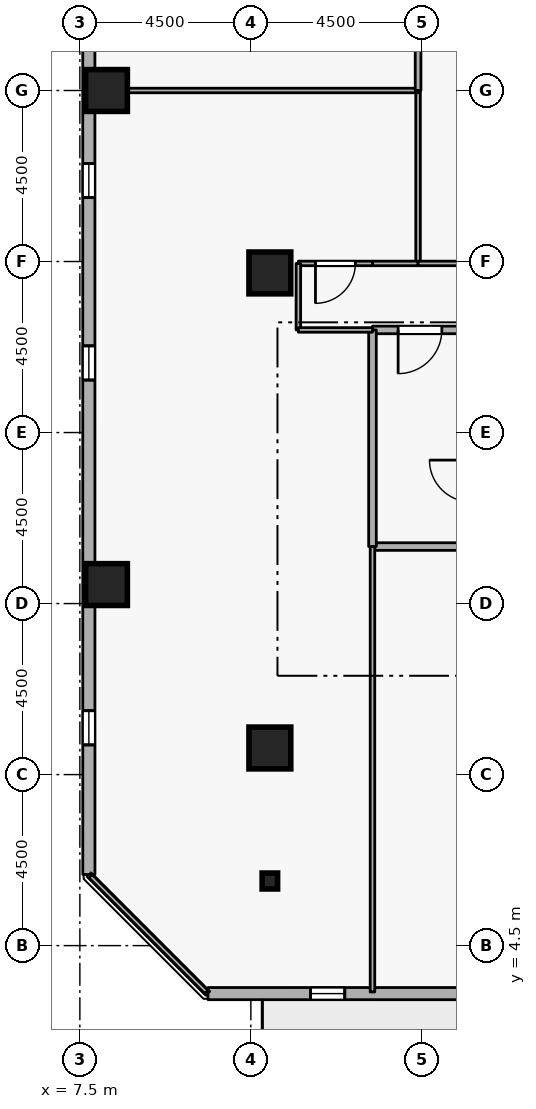
"""IFC4 building model, lengths in metres.
Left out: names, types, materials, properties, quantities, classifications, styles, units other than length and angle.
Written with IfcOpenShell. Run it as: python <this file> out.ifc"""

import sys

from ifc_helpers import new_model, si_unit, direction, frame, frame_2d, origin, origin_2d, place, context, subcontext, project, spatial, rectangle, i_section, extrude, element, fill, save


model = new_model("IFC4")
c1 = context("Model", 3, precision=1e-05, world=origin(), true_north=direction((0.0, 1.0)))
c2 = subcontext(c1, "Body", "Model", "MODEL_VIEW")
j1 = project(units=[si_unit("LENGTHUNIT", "METRE"), si_unit("PLANEANGLEUNIT", "RADIAN")], contexts=[c1])
p1 = place(None, origin())
s1 = spatial("IfcSite", under=j1, at=p1, CompositionType="ELEMENT")
p2 = place(p1, origin())
s2 = spatial("IfcBuilding", under=s1, at=p2, CompositionType="ELEMENT")
p3 = place(p2, frame((0.0, 0.0, 163.5)))
s3 = spatial("IfcBuildingStorey", under=s2, at=p3, CompositionType="ELEMENT", Elevation=163.5)
for number, where, z_axis, x_axis in (
    (1, (12.5, 9.7, 0.0), (0.0, 0.0, 1.0), (1.0, 0.0, 0.0)),
    (2, (8.2, 14.0, 0.0), (0.0, 0.0, 1.0), (1.0, 0.0, 0.0)),
    (3, (8.2, 27.0, 0.0), (0.0, 0.0, 1.0), (1.0, 0.0, 0.0)),
    (4, (12.5, 22.2, 0.0), (0.0, 0.0, 1.0), (1.0, 0.0, 0.0)),
):
    element("IfcColumn", number, at=place(p3, frame(where, z_axis=z_axis, x_axis=x_axis)), inside=s3, PredefinedType="COLUMN", context=c2, shape_type="SweptSolid", body=[
        extrude(rectangle(XDim=1.1, YDim=1.1, at=origin_2d()), origin(), (0.0, 0.0, 1.0), 3.6),
    ])
p4 = place(p3, frame((12.5, 6.2, 0.0), z_axis=(0.0, 0.0, 1.0), x_axis=(1.0, 0.0, 0.0)))
e5 = element("IfcColumn", 5, at=p4, inside=s3, PredefinedType="COLUMN", context=c2, shape_type="SweptSolid", body=[
    extrude(i_section(OverallWidth=0.407, OverallDepth=0.419, WebThickness=0.031, FlangeThickness=0.049, FilletRadius=0.015, at=origin_2d()), origin(), (0.0, 0.0, 1.0), 3.6),
])
p5 = place(p3, frame((10.871, 3.237, 0.0), z_axis=(0.0, 0.0, 1.0), x_axis=(0.999999998513, -5.4540124e-05, 0.0)))
e6 = element("IfcWall", 6, at=p5, inside=s3, PredefinedType="STANDARD", context=c2, shape_type="SweptSolid", body=[
    extrude(rectangle(XDim=35.811, YDim=0.32, at=frame_2d((17.905, 0.0))), origin(), (0.0, 0.0, 1.0), 2.7),
])
p6 = place(p5, frame((22.855, 0.0, 0.0)))
e7 = element("IfcOpeningElement", 7, at=p6, cuts=e6, PredefinedType="OPENING", context=c2, shape_type="SweptSolid", body=[
    extrude(rectangle(XDim=1.0, YDim=2.08, at=frame_2d((0.5, 1.04))), frame((0.0, 0.17, 0.0), z_axis=(0.0, -1.0, 0.0), x_axis=(1.0, 0.0, 0.0)), (0.0, 0.0, 1.0), 0.34),
])
p7 = place(p5, frame((2.7, 0.0, 0.72)))
e8 = element("IfcOpeningElement", 8, at=p7, cuts=e6, PredefinedType="OPENING", context=c2, shape_type="SweptSolid", body=[
    extrude(rectangle(XDim=0.9, YDim=1.75, at=frame_2d((0.45, 0.875))), frame((0.0, 0.17, 0.0), z_axis=(0.0, -1.0, 0.0), x_axis=(1.0, 0.0, 0.0)), (0.0, 0.0, 1.0), 0.34),
])
p8 = place(p5, frame((7.5, 0.0, 0.72)))
e9 = element("IfcOpeningElement", 9, at=p8, cuts=e6, PredefinedType="OPENING", context=c2, shape_type="SweptSolid", body=[
    extrude(rectangle(XDim=0.9, YDim=1.75, at=frame_2d((0.45, 0.875))), frame((0.0, 0.17, 0.0), z_axis=(0.0, -1.0, 0.0), x_axis=(1.0, 0.0, 0.0)), (0.0, 0.0, 1.0), 0.34),
])
p9 = place(p5, frame((12.3, 0.0, 0.72)))
e10 = element("IfcOpeningElement", 10, at=p9, cuts=e6, PredefinedType="OPENING", context=c2, shape_type="SweptSolid", body=[
    extrude(rectangle(XDim=0.9, YDim=1.75, at=frame_2d((0.45, 0.875))), frame((0.0, 0.17, 0.0), z_axis=(0.0, -1.0, 0.0), x_axis=(1.0, 0.0, 0.0)), (0.0, 0.0, 1.0), 0.34),
])
p10 = place(p5, frame((17.1, 0.0, 0.72)))
e11 = element("IfcOpeningElement", 11, at=p10, cuts=e6, PredefinedType="OPENING", context=c2, shape_type="SweptSolid", body=[
    extrude(rectangle(XDim=0.9, YDim=1.75, at=frame_2d((0.45, 0.875))), frame((0.0, 0.17, 0.0), z_axis=(0.0, -1.0, 0.0), x_axis=(1.0, 0.0, 0.0)), (0.0, 0.0, 1.0), 0.34),
])
p11 = place(p5, frame((26.7, 0.0, 0.72)))
e12 = element("IfcOpeningElement", 12, at=p11, cuts=e6, PredefinedType="OPENING", context=c2, shape_type="SweptSolid", body=[
    extrude(rectangle(XDim=0.9, YDim=1.75, at=frame_2d((0.45, 0.875))), frame((0.0, 0.17, 0.0), z_axis=(0.0, -1.0, 0.0), x_axis=(1.0, 0.0, 0.0)), (0.0, 0.0, 1.0), 0.34),
])
p12 = place(p5, frame((31.5, 0.0, 0.72)))
e13 = element("IfcOpeningElement", 13, at=p12, cuts=e6, PredefinedType="OPENING", context=c2, shape_type="SweptSolid", body=[
    extrude(rectangle(XDim=0.9, YDim=1.75, at=frame_2d((0.45, 0.875))), frame((0.0, 0.17, 0.0), z_axis=(0.0, -1.0, 0.0), x_axis=(1.0, 0.0, 0.0)), (0.0, 0.0, 1.0), 0.34),
])
p13 = place(p3, frame((7.735, 42.181, 0.0), z_axis=(0.0, 0.0, 1.0), x_axis=(5.4540124e-05, -0.999999998513, 0.0)))
e14 = element("IfcWall", 14, at=p13, inside=s3, PredefinedType="STANDARD", context=c2, shape_type="SweptSolid", body=[
    extrude(rectangle(XDim=35.811, YDim=0.32, at=frame_2d((17.905, 0.0))), origin(), (0.0, 0.0, 1.0), 2.7),
])
p14 = place(p13, frame((7.5, 0.0, 0.72)))
e15 = element("IfcOpeningElement", 15, at=p14, cuts=e14, PredefinedType="OPENING", context=c2, shape_type="SweptSolid", body=[
    extrude(rectangle(XDim=0.9, YDim=1.75, at=frame_2d((0.45, 0.875))), frame((0.0, 0.17, 0.0), z_axis=(0.0, -1.0, 0.0), x_axis=(1.0, 0.0, 0.0)), (0.0, 0.0, 1.0), 0.34),
])
p15 = place(p13, frame((12.3, 0.0, 0.72)))
e16 = element("IfcOpeningElement", 16, at=p15, cuts=e14, PredefinedType="OPENING", context=c2, shape_type="SweptSolid", body=[
    extrude(rectangle(XDim=0.9, YDim=1.75, at=frame_2d((0.45, 0.875))), frame((0.0, 0.17, 0.0), z_axis=(0.0, -1.0, 0.0), x_axis=(1.0, 0.0, 0.0)), (0.0, 0.0, 1.0), 0.34),
])
p16 = place(p13, frame((17.1, 0.0, 0.72)))
e17 = element("IfcOpeningElement", 17, at=p16, cuts=e14, PredefinedType="OPENING", context=c2, shape_type="SweptSolid", body=[
    extrude(rectangle(XDim=0.9, YDim=1.75, at=frame_2d((0.45, 0.875))), frame((0.0, 0.17, 0.0), z_axis=(0.0, -1.0, 0.0), x_axis=(1.0, 0.0, 0.0)), (0.0, 0.0, 1.0), 0.34),
])
p17 = place(p13, frame((21.9, 0.0, 0.72)))
e18 = element("IfcOpeningElement", 18, at=p17, cuts=e14, PredefinedType="OPENING", context=c2, shape_type="SweptSolid", body=[
    extrude(rectangle(XDim=0.9, YDim=1.75, at=frame_2d((0.45, 0.875))), frame((0.0, 0.17, 0.0), z_axis=(0.0, -1.0, 0.0), x_axis=(1.0, 0.0, 0.0)), (0.0, 0.0, 1.0), 0.34),
])
p18 = place(p13, frame((31.5, 0.0, 0.72)))
e19 = element("IfcOpeningElement", 19, at=p18, cuts=e14, PredefinedType="OPENING", context=c2, shape_type="SweptSolid", body=[
    extrude(rectangle(XDim=0.9, YDim=1.75, at=frame_2d((0.45, 0.875))), frame((0.0, 0.17, 0.0), z_axis=(0.0, -1.0, 0.0), x_axis=(1.0, 0.0, 0.0)), (0.0, 0.0, 1.0), 0.34),
])
p19 = place(p3, frame((15.2, 15.0, 0.0), z_axis=(0.0, 0.0, 1.0), x_axis=(1.0, 0.0, 0.0)))
e20 = element("IfcWall", 20, at=p19, inside=s3, PredefinedType="STANDARD", context=c2, shape_type="SweptSolid", body=[
    extrude(rectangle(XDim=2.5, YDim=0.2, at=frame_2d((1.25, 0.0))), origin(), (0.0, 0.0, 1.0), 3.34),
])
p20 = place(p3, frame((17.7, 20.7, 0.0), z_axis=(0.0, 0.0, 1.0), x_axis=(-1.0, 0.0, 0.0)))
e21 = element("IfcWall", 21, at=p20, inside=s3, PredefinedType="STANDARD", context=c2, shape_type="SweptSolid", body=[
    extrude(rectangle(XDim=2.5, YDim=0.2, at=frame_2d((1.25, 0.0))), origin(), (0.0, 0.0, 1.0), 3.34),
])
p21 = place(p20, frame((0.675, 0.0, 0.0)))
e22 = element("IfcOpeningElement", 22, at=p21, cuts=e21, PredefinedType="OPENING", context=c2, shape_type="SweptSolid", body=[
    extrude(rectangle(XDim=1.15, YDim=2.1, at=frame_2d((0.575, 1.05))), frame((0.0, 0.11, 0.0), z_axis=(0.0, -1.0, 0.0), x_axis=(1.0, 0.0, 0.0)), (0.0, 0.0, 1.0), 0.22),
])
p22 = place(p3, frame((15.2, 20.7, 0.0), z_axis=(0.0, 0.0, 1.0), x_axis=(0.0, -1.0, 0.0)))
e23 = element("IfcWall", 23, at=p22, inside=s3, PredefinedType="STANDARD", context=c2, shape_type="SweptSolid", body=[
    extrude(rectangle(XDim=5.7, YDim=0.2, at=frame_2d((2.85, 0.0))), origin(), (0.0, 0.0, 1.0), 3.34),
])
p23 = place(p3, frame((16.4, 27.0, 0.0), z_axis=(0.0, 0.0, 1.0), x_axis=(0.0, -1.0, 0.0)))
e24 = element("IfcWall", 24, at=p23, inside=s3, PredefinedType="PARTITIONING", context=c2, shape_type="SweptSolid", body=[
    extrude(rectangle(XDim=4.55, YDim=0.12, at=frame_2d((2.275, 0.0))), origin(), (0.0, 0.0, 1.0), 3.34),
])
p24 = place(p3, frame((16.4, 22.45, 0.0), z_axis=(0.0, 0.0, 1.0), x_axis=(-1.0, 0.0, 0.0)))
e25 = element("IfcWall", 25, at=p24, inside=s3, PredefinedType="PARTITIONING", context=c2, shape_type="SweptSolid", body=[
    extrude(rectangle(XDim=1.2, YDim=0.12, at=frame_2d((0.6, 0.0))), origin(), (0.0, 0.0, 1.0), 3.34),
])
p25 = place(p3, frame((15.2, 22.45, 0.0), z_axis=(0.0, 0.0, 1.0), x_axis=(-1.0, 0.0, 0.0)))
e26 = element("IfcWall", 26, at=p25, inside=s3, PredefinedType="PARTITIONING", context=c2, shape_type="SweptSolid", body=[
    extrude(rectangle(XDim=1.95, YDim=0.12, at=frame_2d((0.975, 0.0))), origin(), (0.0, 0.0, 1.0), 3.34),
])
p26 = place(p25, frame((0.45, 0.0, 0.0)))
e27 = element("IfcOpeningElement", 27, at=p26, cuts=e26, PredefinedType="OPENING", context=c2, shape_type="SweptSolid", body=[
    extrude(rectangle(XDim=1.05, YDim=2.1, at=frame_2d((0.525, 1.05))), frame((0.0, 0.07, 0.0), z_axis=(0.0, -1.0, 0.0), x_axis=(1.0, 0.0, 0.0)), (0.0, 0.0, 1.0), 0.14),
])
p27 = place(p3, frame((13.25, 22.45, 0.0), z_axis=(0.0, 0.0, 1.0), x_axis=(0.0, -1.0, 0.0)))
e28 = element("IfcWall", 28, at=p27, inside=s3, PredefinedType="PARTITIONING", context=c2, shape_type="SweptSolid", body=[
    extrude(rectangle(XDim=1.75, YDim=0.12, at=frame_2d((0.875, 0.0))), origin(), (0.0, 0.0, 1.0), 3.34),
])
p28 = place(p3, frame((13.25, 20.7, 0.0), z_axis=(0.0, 0.0, 1.0), x_axis=(1.0, 0.0, 0.0)))
e29 = element("IfcWall", 29, at=p28, inside=s3, PredefinedType="PARTITIONING", context=c2, shape_type="SweptSolid", body=[
    extrude(rectangle(XDim=1.95, YDim=0.12, at=frame_2d((0.975, 0.0))), origin(), (0.0, 0.0, 1.0), 3.34),
])
p29 = place(p3, frame((15.2, 15.0, 0.0), z_axis=(0.0, 0.0, 1.0), x_axis=(0.0, -1.0, 0.0)))
e30 = element("IfcWall", 30, at=p29, inside=s3, PredefinedType="PARTITIONING", context=c2, shape_type="SweptSolid", body=[
    extrude(rectangle(XDim=11.72, YDim=0.12, at=frame_2d((5.86, 0.0))), origin(), (0.0, 0.0, 1.0), 3.34),
])
p30 = place(p3, frame((10.829, 3.28, 0.0), z_axis=(0.0, 0.0, 1.0), x_axis=(-0.707106781187, 0.707106781187, 0.0)))
e31 = element("IfcWall", 31, at=p30, inside=s3, PredefinedType="PARTITIONING", context=c2, shape_type="SweptSolid", body=[
    extrude(rectangle(XDim=4.311, YDim=0.12, at=frame_2d((2.156, 0.0))), origin(), (0.0, 0.0, 1.0), 3.34),
])
p31 = place(p3, frame((7.78, 27.0, 0.0), z_axis=(0.0, 0.0, 1.0), x_axis=(1.0, 0.0, 0.0)))
e32 = element("IfcWall", 32, at=p31, inside=s3, PredefinedType="PARTITIONING", context=c2, shape_type="SweptSolid", body=[
    extrude(rectangle(XDim=8.62, YDim=0.12, at=frame_2d((4.31, 0.0))), origin(), (0.0, 0.0, 1.0), 2.878),
])
p32 = place(p3, frame((16.4, 31.55, 0.0), z_axis=(0.0, 0.0, 1.0), x_axis=(0.0, -1.0, 0.0)))
e33 = element("IfcWall", 33, at=p32, inside=s3, PredefinedType="PARTITIONING", context=c2, shape_type="SweptSolid", body=[
    extrude(rectangle(XDim=4.55, YDim=0.15, at=frame_2d((2.275, 0.0))), origin(), (0.0, 0.0, 1.0), 3.34),
])
p33 = place(p3, frame((20.9, 22.45, 0.0), z_axis=(0.0, 0.0, 1.0), x_axis=(-1.0, 0.0, 0.0)))
e34 = element("IfcWall", 34, at=p33, inside=s3, PredefinedType="PARTITIONING", context=c2, shape_type="SweptSolid", body=[
    extrude(rectangle(XDim=4.5, YDim=0.12, at=frame_2d((2.25, 0.0))), origin(), (0.0, 0.0, 1.0), 3.34),
])
p34 = place(p7, origin())
e35 = element("IfcWindow", 35, at=p34, inside=s3, PartitioningType="SINGLE_PANEL", PredefinedType="WINDOW", context=c2, shape_type="SweptSolid", body=[
    extrude(rectangle(XDim=0.9, YDim=1.75, at=frame_2d((0.45, 0.875))), frame((0.0, 0.03, 0.0), z_axis=(0.0, -1.0, 0.0), x_axis=(1.0, 0.0, 0.0)), (0.0, 0.0, 1.0), 0.06),
])
fill(e8, e35)
p35 = place(p16, origin())
e36 = element("IfcWindow", 36, at=p35, inside=s3, PartitioningType="SINGLE_PANEL", PredefinedType="WINDOW", context=c2, shape_type="SweptSolid", body=[
    extrude(rectangle(XDim=0.9, YDim=1.75, at=frame_2d((0.45, 0.875))), frame((0.0, 0.03, 0.0), z_axis=(0.0, -1.0, 0.0), x_axis=(1.0, 0.0, 0.0)), (0.0, 0.0, 1.0), 0.06),
])
fill(e17, e36)
p36 = place(p17, origin())
e37 = element("IfcWindow", 37, at=p36, inside=s3, PartitioningType="SINGLE_PANEL", PredefinedType="WINDOW", context=c2, shape_type="SweptSolid", body=[
    extrude(rectangle(XDim=0.9, YDim=1.75, at=frame_2d((0.45, 0.875))), frame((0.0, 0.03, 0.0), z_axis=(0.0, -1.0, 0.0), x_axis=(1.0, 0.0, 0.0)), (0.0, 0.0, 1.0), 0.06),
])
fill(e18, e37)
p37 = place(p18, origin())
e38 = element("IfcWindow", 38, at=p37, inside=s3, PartitioningType="SINGLE_PANEL", PredefinedType="WINDOW", context=c2, shape_type="SweptSolid", body=[
    extrude(rectangle(XDim=0.9, YDim=1.75, at=frame_2d((0.45, 0.875))), frame((0.0, 0.03, 0.0), z_axis=(0.0, -1.0, 0.0), x_axis=(1.0, 0.0, 0.0)), (0.0, 0.0, 1.0), 0.06),
])
fill(e19, e38)
p38 = place(p21, origin())
e39 = element("IfcDoor", 39, at=p38, inside=s3, OperationType="SINGLE_SWING_RIGHT", PredefinedType="DOOR", context=c2, shape_type="SweptSolid", body=[
    extrude(rectangle(XDim=1.15, YDim=2.1, at=frame_2d((0.575, 1.05))), frame((0.0, 0.025, 0.0), z_axis=(0.0, -1.0, 0.0), x_axis=(1.0, 0.0, 0.0)), (0.0, 0.0, 1.0), 0.05),
])
fill(e22, e39)
p39 = place(p26, origin())
e40 = element("IfcDoor", 40, at=p39, inside=s3, OperationType="SINGLE_SWING_RIGHT", PredefinedType="DOOR", context=c2, shape_type="SweptSolid", body=[
    extrude(rectangle(XDim=1.05, YDim=2.1, at=frame_2d((0.525, 1.05))), frame((0.0, 0.025, 0.0), z_axis=(0.0, -1.0, 0.0), x_axis=(1.0, 0.0, 0.0)), (0.0, 0.0, 1.0), 0.05),
])
fill(e27, e40)
save(model, sys.argv[1])
